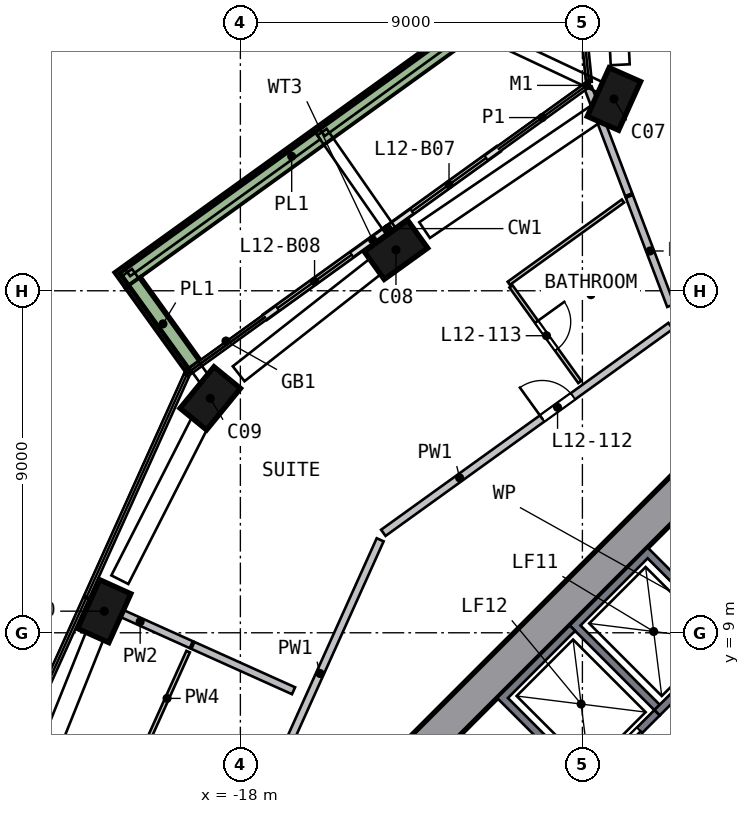
"""IFC4 building model, lengths in metres.
Left out: names, types, materials, properties, quantities, classifications, styles, units other than length and angle.
Written with IfcOpenShell. Run it as: python <this file> out.ifc"""

import sys

from ifc_helpers import new_model, si_unit, direction, frame, frame_2d, origin, origin_2d, place, context, subcontext, project, spatial, polyline, rectangle, outline, extrude, element, fill, save


model = new_model("IFC4")
c1 = context("Model", 3, precision=1e-05, world=origin(), true_north=direction((0.0, 1.0)))
c2 = subcontext(c1, "Body", "Model", "MODEL_VIEW")
j1 = project(units=[si_unit("LENGTHUNIT", "METRE"), si_unit("PLANEANGLEUNIT", "RADIAN")], contexts=[c1])
p1 = place(None, origin())
s1 = spatial("IfcSite", under=j1, at=p1, CompositionType="ELEMENT")
p2 = place(p1, origin())
s2 = spatial("IfcBuilding", under=s1, at=p2, CompositionType="ELEMENT")
p3 = place(p2, frame((0.0, 0.0, 56.5)))
s3 = spatial("IfcBuildingStorey", under=s2, at=p3, CompositionType="ELEMENT", Elevation=56.5)
p4 = place(p3, frame((-8.038, 23.095, 0.0), z_axis=(-0.109537555, -0.039147704, 0.993211448), x_axis=(0.403114018, 0.911612109, 0.080389372)))
e1 = element("IfcColumn", 1, at=p4, inside=s3, PredefinedType="COLUMN", context=c2, shape_type="SweptSolid", body=[
    extrude(rectangle(XDim=1.4, YDim=0.9, at=origin_2d()), origin(), (0.0, 0.0, 1.0), 3.212),
])
p5 = place(p3, frame((-13.796, 19.157, 0.0), z_axis=(-0.090651408, -0.066391509, 0.993667193), x_axis=(-0.806614945, -0.580299679, -0.112359302)))
e2 = element("IfcColumn", 2, at=p5, inside=s3, PredefinedType="COLUMN", context=c2, shape_type="SweptSolid", body=[
    extrude(rectangle(XDim=1.4, YDim=0.9, at=origin_2d()), origin(), (0.0, 0.0, 1.0), 3.21),
])
p6 = place(p3, frame((-18.705, 15.277, 0.0), z_axis=(-0.071922434, -0.089560916, 0.993381098), x_axis=(0.62855588, 0.769236277, 0.114861028)))
e3 = element("IfcColumn", 3, at=p6, inside=s3, PredefinedType="COLUMN", context=c2, shape_type="SweptSolid", body=[
    extrude(rectangle(XDim=1.4, YDim=0.9, at=origin_2d()), origin(), (0.0, 0.0, 1.0), 3.211),
])
p7 = place(p3, frame((-21.527, 9.693, 0.0), z_axis=(-0.045250147, -0.102744451, 0.993678017), x_axis=(-0.408210433, -0.905958686, -0.112263538)))
e4 = element("IfcColumn", 4, at=p7, inside=s3, PredefinedType="COLUMN", context=c2, shape_type="SweptSolid", body=[
    extrude(rectangle(XDim=1.4, YDim=0.9, at=origin_2d()), origin(), (0.0, 0.0, 1.0), 3.21),
])
p8 = place(p3, frame((-5.481, 13.682, 0.0), z_axis=(0.0, 0.0, 1.0), x_axis=(-0.707106781, -0.707106781, 0.0)))
e5 = element("IfcWall", 5, at=p8, inside=s3, PredefinedType="SHEAR", context=c2, shape_type="SweptSolid", body=[
    extrude(rectangle(XDim=11.598, YDim=0.9, at=frame_2d((5.799, 0.0))), origin(), (0.0, 0.0, 1.0), 3.5),
])
p9 = place(p3, frame((-11.211, 21.728, 0.0), z_axis=(0.0, 0.0, 1.0), x_axis=(-0.811486746, -0.584370825, 0.0)))
e6 = element("IfcWall", 6, at=p9, inside=s3, PredefinedType="SOLIDWALL", context=c2, shape_type="SweptSolid", body=[
    extrude(rectangle(XDim=3.6, YDim=0.15, at=frame_2d((1.8, 0.0))), origin(), (0.0, 0.0, 1.0), 2.425),
])
p10 = place(p9, frame((0.4, 0.0, 0.0)))
e7 = element("IfcOpeningElement", 7, at=p10, cuts=e6, PredefinedType="OPENING", context=c2, shape_type="SweptSolid", body=[
    extrude(rectangle(XDim=2.4, YDim=2.4, at=frame_2d((1.2, 1.2))), frame((0.0, 0.085, 0.0), z_axis=(0.0, -1.0, 0.0), x_axis=(1.0, 0.0, 0.0)), (0.0, 0.0, 1.0), 0.17),
])
p11 = place(p3, frame((-14.133, 19.624, 0.0), z_axis=(0.0, 0.0, 1.0), x_axis=(-0.811478215, -0.584382671, 0.0)))
e8 = element("IfcWall", 8, at=p11, inside=s3, PredefinedType="SOLIDWALL", context=c2, shape_type="SweptSolid", body=[
    extrude(rectangle(XDim=3.96, YDim=0.15, at=frame_2d((1.98, 0.0))), origin(), (0.0, 0.0, 1.0), 2.425),
])
p12 = place(p11, frame((1.16, 0.0, 0.0)))
e9 = element("IfcOpeningElement", 9, at=p12, cuts=e8, PredefinedType="OPENING", context=c2, shape_type="SweptSolid", body=[
    extrude(rectangle(XDim=2.4, YDim=2.4, at=frame_2d((1.2, 1.2))), frame((0.0, 0.085, 0.0), z_axis=(0.0, -1.0, 0.0), x_axis=(1.0, 0.0, 0.0)), (0.0, 0.0, 1.0), 0.17),
])
p13 = place(p3, frame((-12.125, 24.798, 0.0), z_axis=(0.0, 0.0, 1.0), x_axis=(-0.811471638, -0.584391804, 0.0)))
e10 = element("IfcWall", 10, at=p13, inside=s3, PredefinedType="SOLIDWALL", context=c2, shape_type="SweptSolid", body=[
    extrude(rectangle(XDim=11.152, YDim=0.5, at=frame_2d((5.576, 0.0))), origin(), (0.0, 0.0, 1.0), 0.7),
])
p14 = place(p3, frame((-20.826, 18.223, 0.0), z_axis=(0.0, 0.0, 1.0), x_axis=(0.584416714, -0.811453698, 0.0)))
e11 = element("IfcWall", 11, at=p14, inside=s3, PredefinedType="SOLIDWALL", context=c2, shape_type="SweptSolid", body=[
    extrude(rectangle(XDim=2.699, YDim=0.5, at=frame_2d((1.35, 0.0))), origin(), (0.0, 0.0, 1.0), 0.7),
])
p15 = place(p3, origin())
e12 = element("IfcWall", 12, at=p15, inside=s3, PredefinedType="SOLIDWALL", context=c2, shape_type="SweptSolid", body=[
    extrude(outline(polyline([(-9.334, 9.192), (-7.283, 11.243), (-5.056, 9.016), (-5.197, 8.874), (-7.283, 10.96), (-9.051, 9.192), (-6.965, 7.106), (-7.106, 6.965), (-9.334, 9.192)])), origin(), (0.0, 0.0, 1.0), 3.19),
])
p16 = place(p3, frame((-4.985, 8.945, 0.0), z_axis=(0.0, 0.0, 1.0), x_axis=(-0.707106781, -0.707106781, 0.0)))
e13 = element("IfcWall", 13, at=p16, inside=s3, PredefinedType="SOLIDWALL", context=c2, shape_type="SweptSolid", body=[
    extrude(rectangle(XDim=2.9, YDim=0.2, at=frame_2d((1.45, 0.0))), origin(), (0.0, 0.0, 1.0), 3.19),
])
p17 = place(p16, frame((0.85, 0.0, 0.0)))
e14 = element("IfcOpeningElement", 14, at=p17, cuts=e13, PredefinedType="OPENING", context=c2, shape_type="SweptSolid", body=[
    extrude(rectangle(XDim=1.2, YDim=2.1, at=frame_2d((0.6, 1.05))), frame((0.0, 0.11, 0.0), z_axis=(0.0, -1.0, 0.0), x_axis=(1.0, 0.0, 0.0)), (0.0, 0.0, 1.0), 0.22),
])
p18 = place(p3, origin())
e15 = element("IfcWall", 15, at=p18, inside=s3, PredefinedType="SOLIDWALL", context=c2, shape_type="SweptSolid", body=[
    extrude(outline(polyline([(-11.243, 7.283), (-9.334, 9.192), (-9.192, 9.051), (-10.96, 7.283), (-8.874, 5.197), (-9.016, 5.056), (-11.243, 7.283)])), origin(), (0.0, 0.0, 1.0), 3.19),
])
p19 = place(p3, frame((-7.036, 6.894, 0.0), z_axis=(0.0, 0.0, 1.0), x_axis=(-0.707106781, -0.707106781, 0.0)))
e16 = element("IfcWall", 16, at=p19, inside=s3, PredefinedType="SOLIDWALL", context=c2, shape_type="SweptSolid", body=[
    extrude(rectangle(XDim=2.7, YDim=0.2, at=frame_2d((1.35, 0.0))), origin(), (0.0, 0.0, 1.0), 3.19),
])
p20 = place(p19, frame((0.65, 0.0, 0.0)))
e17 = element("IfcOpeningElement", 17, at=p20, cuts=e16, PredefinedType="OPENING", context=c2, shape_type="SweptSolid", body=[
    extrude(rectangle(XDim=1.2, YDim=2.1, at=frame_2d((0.6, 1.05))), frame((0.0, 0.11, 0.0), z_axis=(0.0, -1.0, 0.0), x_axis=(1.0, 0.0, 0.0)), (0.0, 0.0, 1.0), 0.22),
])
p21 = place(p3, frame((-2.864, 6.823, 0.0), z_axis=(0.0, 0.0, 1.0), x_axis=(-0.707106781, -0.707106781, 0.0)))
e18 = element("IfcWall", 18, at=p21, inside=s3, PredefinedType="SOLIDWALL", context=c2, shape_type="SweptSolid", body=[
    extrude(rectangle(XDim=5.6, YDim=0.2, at=frame_2d((2.8, 0.0))), origin(), (0.0, 0.0, 1.0), 3.19),
])
p22 = place(p21, frame((2.2, 0.0, 0.0)))
e19 = element("IfcOpeningElement", 19, at=p22, cuts=e18, PredefinedType="OPENING", context=c2, shape_type="SweptSolid", body=[
    extrude(rectangle(XDim=1.2, YDim=2.1, at=frame_2d((0.6, 1.05))), frame((0.0, 0.11, 0.0), z_axis=(0.0, -1.0, 0.0), x_axis=(1.0, 0.0, 0.0)), (0.0, 0.0, 1.0), 0.22),
])
p23 = place(p3, frame((-18.064, 3.135, 0.0), z_axis=(0.0, 0.0, 1.0), x_axis=(0.410581824, 0.911823758, 0.0)))
e20 = element("IfcWall", 20, at=p23, inside=s3, PredefinedType="SOLIDWALL", context=c2, shape_type="SweptSolid", body=[
    extrude(rectangle(XDim=9.115, YDim=0.2, at=frame_2d((4.558, 0.0))), origin(), (0.0, 0.0, 1.0), 3.19),
])
p24 = place(p23, frame((0.2, 0.0, 0.0)))
e21 = element("IfcOpeningElement", 21, at=p24, cuts=e20, PredefinedType="OPENING", context=c2, shape_type="SweptSolid", body=[
    extrude(rectangle(XDim=1.0, YDim=2.1, at=frame_2d((0.5, 1.05))), frame((0.0, 0.11, 0.0), z_axis=(0.0, -1.0, 0.0), x_axis=(1.0, 0.0, 0.0)), (0.0, 0.0, 1.0), 0.22),
])
p25 = place(p3, frame((-14.239, 11.63, 0.0), z_axis=(0.0, 0.0, 1.0), x_axis=(0.811460769, 0.584406897, 0.0)))
e22 = element("IfcWall", 22, at=p25, inside=s3, PredefinedType="SOLIDWALL", context=c2, shape_type="SweptSolid", body=[
    extrude(rectangle(XDim=9.316, YDim=0.2, at=frame_2d((4.658, 0.0))), origin(), (0.0, 0.0, 1.0), 3.19),
])
p26 = place(p25, frame((5.15, 0.0, 0.0)))
e23 = element("IfcOpeningElement", 23, at=p26, cuts=e22, PredefinedType="OPENING", context=c2, shape_type="SweptSolid", body=[
    extrude(rectangle(XDim=1.0, YDim=2.1, at=frame_2d((0.5, 1.05))), frame((0.0, 0.11, 0.0), z_axis=(0.0, -1.0, 0.0), x_axis=(1.0, 0.0, 0.0)), (0.0, 0.0, 1.0), 0.22),
])
p27 = place(p3, frame((-19.291, 8.686, 0.0), z_axis=(0.0, 0.0, 1.0), x_axis=(-0.911805409, 0.410622572, 0.0)))
e24 = element("IfcWall", 24, at=p27, inside=s3, PredefinedType="SOLIDWALL", context=c2, shape_type="SweptSolid", body=[
    extrude(rectangle(XDim=2.952, YDim=0.2, at=frame_2d((1.476, 0.0))), origin(), (0.0, 0.0, 1.0), 3.19),
])
p28 = place(p3, frame((-16.601, 7.475, 0.0), z_axis=(0.0, 0.0, 1.0), x_axis=(-0.911845996, 0.410532434, 0.0)))
e25 = element("IfcWall", 25, at=p28, inside=s3, PredefinedType="SOLIDWALL", context=c2, shape_type="SweptSolid", body=[
    extrude(rectangle(XDim=2.905, YDim=0.2, at=frame_2d((1.452, 0.0))), origin(), (0.0, 0.0, 1.0), 3.19),
])
p29 = place(p3, frame((-7.781, 20.527, 0.0), z_axis=(0.0, 0.0, 1.0), x_axis=(-0.354444046, 0.935077226, 0.0)))
e26 = element("IfcWall", 26, at=p29, inside=s3, PredefinedType="SOLIDWALL", context=c2, shape_type="SweptSolid", body=[
    extrude(rectangle(XDim=3.011, YDim=0.2, at=frame_2d((1.506, 0.0))), origin(), (0.0, 0.0, 1.0), 3.19),
])
p30 = place(p3, frame((-6.675, 17.609, 0.0), z_axis=(0.0, 0.0, 1.0), x_axis=(-0.354462731, 0.935070143, 0.0)))
e27 = element("IfcWall", 27, at=p30, inside=s3, PredefinedType="SOLIDWALL", context=c2, shape_type="SweptSolid", body=[
    extrude(rectangle(XDim=3.075, YDim=0.2, at=frame_2d((1.537, 0.0))), origin(), (0.0, 0.0, 1.0), 3.19),
])
p31 = place(p3, frame((-20.483, 6.042, 0.0), z_axis=(0.0, 0.0, 1.0), x_axis=(0.410530105, 0.911847045, 0.0)))
e28 = element("IfcWall", 28, at=p31, inside=s3, PredefinedType="PARTITIONING", context=c2, shape_type="SweptSolid", body=[
    extrude(rectangle(XDim=2.7, YDim=0.1, at=frame_2d((1.35, 0.0))), origin(), (0.0, 0.0, 1.0), 3.19),
])
p32 = place(p3, frame((-10.879, 18.116, 0.0), z_axis=(0.0, 0.0, 1.0), x_axis=(0.584362816, -0.811492514, 0.0)))
e29 = element("IfcWall", 29, at=p32, inside=s3, PredefinedType="PARTITIONING", context=c2, shape_type="SweptSolid", body=[
    extrude(rectangle(XDim=3.1, YDim=0.1, at=frame_2d((1.55, 0.0))), origin(), (0.0, 0.0, 1.0), 3.19),
])
p33 = place(p32, frame((1.15, 0.0, 0.0)))
e30 = element("IfcOpeningElement", 30, at=p33, cuts=e29, PredefinedType="OPENING", context=c2, shape_type="SweptSolid", body=[
    extrude(rectangle(XDim=0.9, YDim=2.1, at=frame_2d((0.45, 1.05))), frame((0.0, 0.06, 0.0), z_axis=(0.0, -1.0, 0.0), x_axis=(1.0, 0.0, 0.0)), (0.0, 0.0, 1.0), 0.12),
])
p34 = place(p3, frame((-10.938, 18.197, 0.0), z_axis=(0.0, 0.0, 1.0), x_axis=(0.811491834, 0.584363759, 0.0)))
e31 = element("IfcWall", 31, at=p34, inside=s3, PredefinedType="PARTITIONING", context=c2, shape_type="SweptSolid", body=[
    extrude(rectangle(XDim=3.704, YDim=0.1, at=frame_2d((1.852, 0.0))), origin(), (0.0, 0.0, 1.0), 3.19),
])
p35 = place(p10, origin())
e32 = element("IfcDoor", 32, at=p35, inside=s3, OperationType="SLIDING_TO_RIGHT", PredefinedType="DOOR", context=c2, shape_type="SweptSolid", body=[
    extrude(rectangle(XDim=2.4, YDim=2.4, at=frame_2d((1.2, 1.2))), frame((0.0, 0.025, 0.0), z_axis=(0.0, -1.0, 0.0), x_axis=(1.0, 0.0, 0.0)), (0.0, 0.0, 1.0), 0.05),
])
fill(e7, e32)
p36 = place(p12, origin())
e33 = element("IfcDoor", 33, at=p36, inside=s3, OperationType="SLIDING_TO_LEFT", PredefinedType="DOOR", context=c2, shape_type="SweptSolid", body=[
    extrude(rectangle(XDim=2.4, YDim=2.4, at=frame_2d((1.2, 1.2))), frame((0.0, 0.025, 0.0), z_axis=(0.0, -1.0, 0.0), x_axis=(1.0, 0.0, 0.0)), (0.0, 0.0, 1.0), 0.05),
])
fill(e9, e33)
p37 = place(p20, origin())
e34 = element("IfcDoor", 34, at=p37, inside=s3, OperationType="DOUBLE_DOOR_SLIDING", PredefinedType="DOOR", context=c2, shape_type="SweptSolid", body=[
    extrude(rectangle(XDim=1.2, YDim=2.1, at=frame_2d((0.6, 1.05))), frame((0.0, 0.025, 0.0), z_axis=(0.0, -1.0, 0.0), x_axis=(1.0, 0.0, 0.0)), (0.0, 0.0, 1.0), 0.05),
])
fill(e17, e34)
p38 = place(p26, origin())
e35 = element("IfcDoor", 35, at=p38, inside=s3, OperationType="SINGLE_SWING_LEFT", PredefinedType="DOOR", context=c2, shape_type="SweptSolid", body=[
    extrude(rectangle(XDim=1.0, YDim=2.1, at=frame_2d((0.5, 1.05))), frame((0.0, 0.025, 0.0), z_axis=(0.0, -1.0, 0.0), x_axis=(1.0, 0.0, 0.0)), (0.0, 0.0, 1.0), 0.05),
])
fill(e23, e35)
p39 = place(p33, origin())
e36 = element("IfcDoor", 36, at=p39, inside=s3, OperationType="SINGLE_SWING_LEFT", PredefinedType="DOOR", context=c2, shape_type="SweptSolid", body=[
    extrude(rectangle(XDim=0.9, YDim=2.1, at=frame_2d((0.45, 1.05))), frame((0.0, 0.025, 0.0), z_axis=(0.0, -1.0, 0.0), x_axis=(1.0, 0.0, 0.0)), (0.0, 0.0, 1.0), 0.05),
])
fill(e30, e36)
save(model, sys.argv[1])
